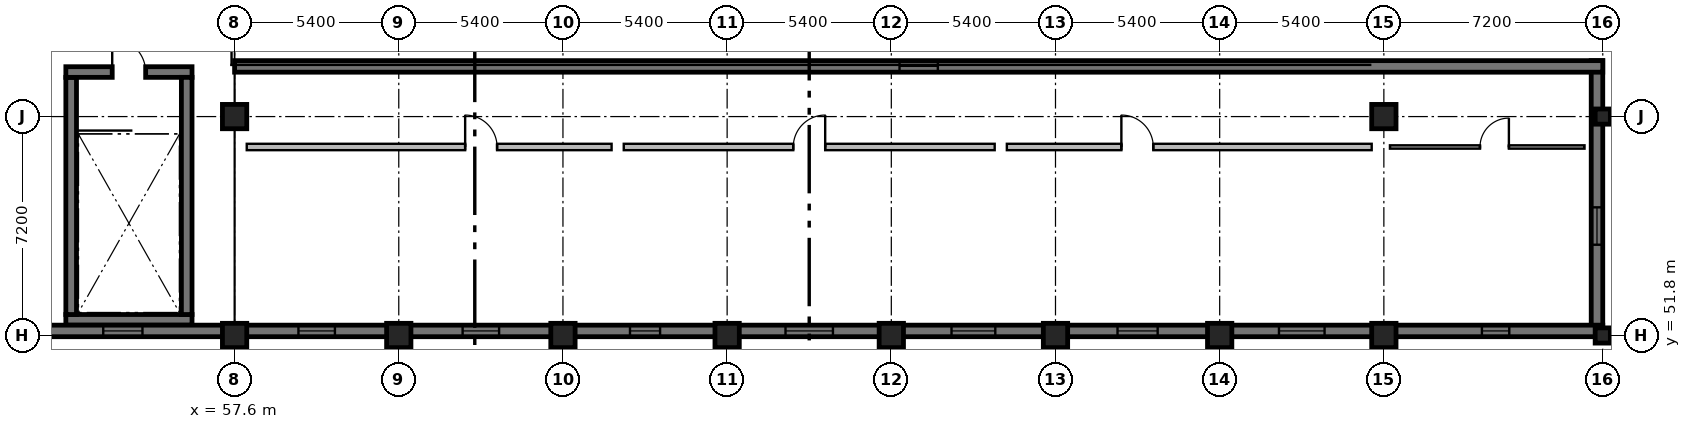
"""IFC4 building model, lengths in metres.
Left out: names, types, materials, properties, quantities, classifications, styles, units other than length and angle.
Written with IfcOpenShell. Run it as: python <this file> out.ifc"""

import sys

from ifc_helpers import new_model, si_unit, direction, frame, frame_2d, origin, origin_2d, place, context, subcontext, project, spatial, rectangle, extrude, element, fill, save


model = new_model("IFC4")
c1 = context("Model", 3, precision=1e-05, world=origin(), true_north=direction((0.0, 1.0)))
c2 = subcontext(c1, "Body", "Model", "MODEL_VIEW")
j1 = project(units=[si_unit("LENGTHUNIT", "METRE"), si_unit("PLANEANGLEUNIT", "RADIAN")], contexts=[c1])
p1 = place(None, origin())
s1 = spatial("IfcSite", under=j1, at=p1, CompositionType="ELEMENT")
p2 = place(p1, origin())
s2 = spatial("IfcBuilding", under=s1, at=p2, CompositionType="ELEMENT")
p3 = place(p2, frame((0.0, 0.0, 13.2)))
s3 = spatial("IfcBuildingStorey", under=s2, at=p3, CompositionType="ELEMENT", Elevation=13.2)
p4 = place(p3, frame((68.4, 51.8, 0.0), z_axis=(0.0, 0.0, 1.0), x_axis=(1.0, 0.0, 0.0)))
e1 = element("IfcColumn", 1, at=p4, inside=s3, PredefinedType="COLUMN", context=c2, shape_type="SweptSolid", body=[
    extrude(rectangle(XDim=0.8, YDim=0.8, at=origin_2d()), origin(), (0.0, 0.0, 1.0), 7.44),
])
for number, where, z_axis, x_axis in (
    (2, (73.8, 51.8, 0.0), (0.0, 0.0, 1.0), (1.0, 0.0, 0.0)),
    (3, (79.2, 51.8, 0.0), (0.0, 0.0, 1.0), (1.0, 0.0, 0.0)),
):
    element("IfcColumn", number, at=place(p3, frame(where, z_axis=z_axis, x_axis=x_axis)), inside=s3, PredefinedType="COLUMN", context=c2, shape_type="SweptSolid", body=[
        extrude(rectangle(XDim=0.8, YDim=0.8, at=origin_2d()), origin(), (0.0, 0.0, 1.0), 8.699),
    ])
p5 = place(p3, frame((84.6, 51.8, 0.0), z_axis=(0.0, 0.0, 1.0), x_axis=(1.0, 0.0, 0.0)))
e4 = element("IfcColumn", 4, at=p5, inside=s3, PredefinedType="COLUMN", context=c2, shape_type="SweptSolid", body=[
    extrude(rectangle(XDim=0.8, YDim=0.8, at=origin_2d()), origin(), (0.0, 0.0, 1.0), 7.44),
])
p6 = place(p3, frame((90.0, 51.8, 0.0), z_axis=(0.0, 0.0, 1.0), x_axis=(1.0, 0.0, 0.0)))
e5 = element("IfcColumn", 5, at=p6, inside=s3, PredefinedType="COLUMN", context=c2, shape_type="SweptSolid", body=[
    extrude(rectangle(XDim=0.8, YDim=0.8, at=origin_2d()), origin(), (0.0, 0.0, 1.0), 5.705),
])
p7 = place(p3, frame((95.4, 51.8, 0.0), z_axis=(0.0, 0.0, 1.0), x_axis=(1.0, 0.0, 0.0)))
e6 = element("IfcColumn", 6, at=p7, inside=s3, PredefinedType="COLUMN", context=c2, shape_type="SweptSolid", body=[
    extrude(rectangle(XDim=0.8, YDim=0.8, at=origin_2d()), origin(), (0.0, 0.0, 1.0), 3.9),
])
p8 = place(p3, frame((95.4, 59.0, 0.0), z_axis=(0.0, 0.0, 1.0), x_axis=(1.0, 0.0, 0.0)))
e7 = element("IfcColumn", 7, at=p8, inside=s3, PredefinedType="COLUMN", context=c2, shape_type="SweptSolid", body=[
    extrude(rectangle(XDim=0.8, YDim=0.8, at=origin_2d()), origin(), (0.0, 0.0, 1.0), 5.542),
])
for number, where, z_axis, x_axis in (
    (8, (102.6, 51.8, 0.0), (0.0, 0.0, 1.0), (1.0, 0.0, 0.0)),
    (9, (102.6, 59.0, 0.0), (0.0, 0.0, 1.0), (1.0, 0.0, 0.0)),
):
    element("IfcColumn", number, at=place(p3, frame(where, z_axis=z_axis, x_axis=x_axis)), inside=s3, PredefinedType="COLUMN", context=c2, shape_type="SweptSolid", body=[
        extrude(rectangle(XDim=0.5, YDim=0.5, at=origin_2d()), origin(), (0.0, 0.0, 1.0), 3.9),
    ])
p9 = place(p3, frame((57.6, 51.8, 0.0), z_axis=(0.0, 0.0, 1.0), x_axis=(1.0, 0.0, 0.0)))
e10 = element("IfcColumn", 10, at=p9, inside=s3, PredefinedType="COLUMN", context=c2, shape_type="SweptSolid", body=[
    extrude(rectangle(XDim=0.8, YDim=0.8, at=origin_2d()), origin(), (0.0, 0.0, 1.0), 3.9),
])
p10 = place(p3, frame((57.6, 59.0, 0.0), z_axis=(0.0, 0.0, 1.0), x_axis=(1.0, 0.0, 0.0)))
e11 = element("IfcColumn", 11, at=p10, inside=s3, PredefinedType="COLUMN", context=c2, shape_type="SweptSolid", body=[
    extrude(rectangle(XDim=0.8, YDim=0.8, at=origin_2d()), origin(), (0.0, 0.0, 1.0), 5.542),
])
p11 = place(p3, frame((63.0, 51.8, 0.0), z_axis=(0.0, 0.0, 1.0), x_axis=(1.0, 0.0, 0.0)))
e12 = element("IfcColumn", 12, at=p11, inside=s3, PredefinedType="COLUMN", context=c2, shape_type="SweptSolid", body=[
    extrude(rectangle(XDim=0.8, YDim=0.8, at=origin_2d()), origin(), (0.0, 0.0, 1.0), 5.705),
])
p12 = place(p3, frame((56.2, 52.315, 0.0), z_axis=(0.0, 0.0, 1.0), x_axis=(-1.0, 0.0, 0.0)))
e13 = element("IfcWall", 13, at=p12, inside=s3, PredefinedType="SOLIDWALL", context=c2, shape_type="SweptSolid", body=[
    extrude(rectangle(XDim=4.15, YDim=0.35, at=frame_2d((2.075, 0.0))), origin(), (0.0, 0.0, 1.0), 4.3),
])
p13 = place(p3, frame((52.225, 52.49, 0.0), z_axis=(0.0, 0.0, 1.0), x_axis=(0.0, 1.0, 0.0)))
e14 = element("IfcWall", 14, at=p13, inside=s3, PredefinedType="SOLIDWALL", context=c2, shape_type="SweptSolid", body=[
    extrude(rectangle(XDim=7.8, YDim=0.35, at=frame_2d((3.9, 0.0))), origin(), (0.0, 0.0, 1.0), 4.3),
])
p14 = place(p3, frame((52.05, 60.465, 0.0), z_axis=(0.0, 0.0, 1.0), x_axis=(1.0, 0.0, 0.0)))
e15 = element("IfcWall", 15, at=p14, inside=s3, PredefinedType="SOLIDWALL", context=c2, shape_type="SweptSolid", body=[
    extrude(rectangle(XDim=4.15, YDim=0.35, at=frame_2d((2.075, 0.0))), origin(), (0.0, 0.0, 1.0), 4.3),
])
p15 = place(p14, frame((1.525, 0.0, 0.0)))
e16 = element("IfcOpeningElement", 16, at=p15, cuts=e15, PredefinedType="OPENING", context=c2, shape_type="SweptSolid", body=[
    extrude(rectangle(XDim=1.1, YDim=2.15, at=frame_2d((0.55, 1.075))), frame((0.0, 0.195, 0.0), z_axis=(0.0, -1.0, 0.0), x_axis=(1.0, 0.0, 0.0)), (0.0, 0.0, 1.0), 0.39),
])
p16 = place(p3, frame((56.025, 60.29, 0.0), z_axis=(0.0, 0.0, 1.0), x_axis=(0.0, -1.0, 0.0)))
e17 = element("IfcWall", 17, at=p16, inside=s3, PredefinedType="SOLIDWALL", context=c2, shape_type="SweptSolid", body=[
    extrude(rectangle(XDim=7.8, YDim=0.35, at=frame_2d((3.9, 0.0))), origin(), (0.0, 0.0, 1.0), 4.3),
])
p17 = place(p3, frame((102.41, 51.8, 0.0), z_axis=(0.0, 0.0, 1.0), x_axis=(0.0, 1.0, 0.0)))
e18 = element("IfcWall", 18, at=p17, inside=s3, PredefinedType="SOLIDWALL", context=c2, shape_type="SweptSolid", body=[
    extrude(rectangle(XDim=9.04, YDim=0.38, at=frame_2d((4.52, 0.0))), origin(), (0.0, 0.0, 1.0), 3.65),
])
p18 = place(p17, frame((2.985, 0.0, 0.95)))
e19 = element("IfcOpeningElement", 19, at=p18, cuts=e18, PredefinedType="OPENING", context=c2, shape_type="SweptSolid", body=[
    extrude(rectangle(XDim=1.23, YDim=1.65, at=frame_2d((0.615, 0.825))), frame((0.0, 0.21, 0.0), z_axis=(0.0, -1.0, 0.0), x_axis=(1.0, 0.0, 0.0)), (0.0, 0.0, 1.0), 0.42),
])
p19 = place(p3, frame((57.6, 60.65, 0.0), z_axis=(0.0, 0.0, 1.0), x_axis=(1.0, 0.0, 0.0)))
e20 = element("IfcWall", 20, at=p19, inside=s3, PredefinedType="SOLIDWALL", context=c2, shape_type="SweptSolid", body=[
    extrude(rectangle(XDim=45.0, YDim=0.38, at=frame_2d((22.5, 0.0))), origin(), (0.0, 0.0, 1.0), 3.65),
])
p20 = place(p19, frame((21.87, 0.0, 0.95)))
e21 = element("IfcOpeningElement", 21, at=p20, cuts=e20, PredefinedType="OPENING", context=c2, shape_type="SweptSolid", body=[
    extrude(rectangle(XDim=1.26, YDim=1.65, at=frame_2d((0.63, 0.825))), frame((0.0, 0.21, 0.0), z_axis=(0.0, -1.0, 0.0), x_axis=(1.0, 0.0, 0.0)), (0.0, 0.0, 1.0), 0.42),
])
p21 = place(p3, frame((50.4, 51.95, 0.0), z_axis=(0.0, 0.0, 1.0), x_axis=(1.0, 0.0, 0.0)))
e22 = element("IfcWall", 22, at=p21, inside=s3, PredefinedType="SOLIDWALL", context=c2, shape_type="SweptSolid", body=[
    extrude(rectangle(XDim=52.2, YDim=0.38, at=frame_2d((26.1, 0.0))), origin(), (0.0, 0.0, 1.0), 3.2),
])
p22 = place(p21, frame((2.88, 0.0, 0.95)))
e23 = element("IfcOpeningElement", 23, at=p22, cuts=e22, PredefinedType="OPENING", context=c2, shape_type="SweptSolid", body=[
    extrude(rectangle(XDim=1.29, YDim=1.65, at=frame_2d((0.645, 0.825))), frame((0.0, 0.21, 0.0), z_axis=(0.0, -1.0, 0.0), x_axis=(1.0, 0.0, 0.0)), (0.0, 0.0, 1.0), 0.42),
])
p23 = place(p21, frame((9.3, 0.0, 0.95)))
e24 = element("IfcOpeningElement", 24, at=p23, cuts=e22, PredefinedType="OPENING", context=c2, shape_type="SweptSolid", body=[
    extrude(rectangle(XDim=1.2, YDim=1.9, at=frame_2d((0.6, 0.95))), frame((0.0, 0.21, 0.0), z_axis=(0.0, -1.0, 0.0), x_axis=(1.0, 0.0, 0.0)), (0.0, 0.0, 1.0), 0.42),
])
p24 = place(p21, frame((14.7, 0.0, 0.95)))
e25 = element("IfcOpeningElement", 25, at=p24, cuts=e22, PredefinedType="OPENING", context=c2, shape_type="SweptSolid", body=[
    extrude(rectangle(XDim=1.2, YDim=2.05, at=frame_2d((0.6, 1.025))), frame((0.0, 0.21, 0.0), z_axis=(0.0, -1.0, 0.0), x_axis=(1.0, 0.0, 0.0)), (0.0, 0.0, 1.0), 0.42),
])
p25 = place(p21, frame((20.205, 0.0, 0.95)))
e26 = element("IfcOpeningElement", 26, at=p25, cuts=e22, PredefinedType="OPENING", context=c2, shape_type="SweptSolid", body=[
    extrude(rectangle(XDim=0.99, YDim=1.55, at=frame_2d((0.495, 0.775))), frame((0.0, 0.21, 0.0), z_axis=(0.0, -1.0, 0.0), x_axis=(1.0, 0.0, 0.0)), (0.0, 0.0, 1.0), 0.42),
])
p26 = place(p21, frame((25.32, 0.0, 0.95)))
e27 = element("IfcOpeningElement", 27, at=p26, cuts=e22, PredefinedType="OPENING", context=c2, shape_type="SweptSolid", body=[
    extrude(rectangle(XDim=1.56, YDim=1.75, at=frame_2d((0.78, 0.875))), frame((0.0, 0.21, 0.0), z_axis=(0.0, -1.0, 0.0), x_axis=(1.0, 0.0, 0.0)), (0.0, 0.0, 1.0), 0.42),
])
p27 = place(p21, frame((30.78, 0.0, 0.95)))
e28 = element("IfcOpeningElement", 28, at=p27, cuts=e22, PredefinedType="OPENING", context=c2, shape_type="SweptSolid", body=[
    extrude(rectangle(XDim=1.44, YDim=1.7, at=frame_2d((0.72, 0.85))), frame((0.0, 0.21, 0.0), z_axis=(0.0, -1.0, 0.0), x_axis=(1.0, 0.0, 0.0)), (0.0, 0.0, 1.0), 0.42),
])
p28 = place(p21, frame((36.24, 0.0, 0.95)))
e29 = element("IfcOpeningElement", 29, at=p28, cuts=e22, PredefinedType="OPENING", context=c2, shape_type="SweptSolid", body=[
    extrude(rectangle(XDim=1.32, YDim=1.9, at=frame_2d((0.66, 0.95))), frame((0.0, 0.21, 0.0), z_axis=(0.0, -1.0, 0.0), x_axis=(1.0, 0.0, 0.0)), (0.0, 0.0, 1.0), 0.42),
])
p29 = place(p21, frame((41.55, 0.0, 0.95)))
e30 = element("IfcOpeningElement", 30, at=p29, cuts=e22, PredefinedType="OPENING", context=c2, shape_type="SweptSolid", body=[
    extrude(rectangle(XDim=1.5, YDim=2.0, at=frame_2d((0.75, 1.0))), frame((0.0, 0.21, 0.0), z_axis=(0.0, -1.0, 0.0), x_axis=(1.0, 0.0, 0.0)), (0.0, 0.0, 1.0), 0.42),
])
p30 = place(p21, frame((48.225, 0.0, 0.95)))
e31 = element("IfcOpeningElement", 31, at=p30, cuts=e22, PredefinedType="OPENING", context=c2, shape_type="SweptSolid", body=[
    extrude(rectangle(XDim=0.9, YDim=1.55, at=frame_2d((0.45, 0.775))), frame((0.0, 0.21, 0.0), z_axis=(0.0, -1.0, 0.0), x_axis=(1.0, 0.0, 0.0)), (0.0, 0.0, 1.0), 0.42),
])
p31 = place(p3, frame((58.0, 58.0, 0.0), z_axis=(0.0, 0.0, 1.0), x_axis=(1.0, 0.0, 0.0)))
e32 = element("IfcWall", 32, at=p31, inside=s3, PredefinedType="PARTITIONING", context=c2, shape_type="SweptSolid", body=[
    extrude(rectangle(XDim=12.0, YDim=0.21, at=frame_2d((6.0, 0.0))), origin(), (0.0, 0.0, 1.0), 3.66),
])
p32 = place(p31, frame((7.183, 0.0, 0.0)))
e33 = element("IfcOpeningElement", 33, at=p32, cuts=e32, PredefinedType="OPENING", context=c2, shape_type="SweptSolid", body=[
    extrude(rectangle(XDim=1.05, YDim=2.15, at=frame_2d((0.525, 1.075))), frame((0.0, 0.125, 0.0), z_axis=(0.0, -1.0, 0.0), x_axis=(1.0, 0.0, 0.0)), (0.0, 0.0, 1.0), 0.25),
])
p33 = place(p3, frame((70.4, 58.0, 0.0), z_axis=(0.0, 0.0, 1.0), x_axis=(1.0, 0.0, 0.0)))
e34 = element("IfcWall", 34, at=p33, inside=s3, PredefinedType="PARTITIONING", context=c2, shape_type="SweptSolid", body=[
    extrude(rectangle(XDim=12.2, YDim=0.21, at=frame_2d((6.1, 0.0))), origin(), (0.0, 0.0, 1.0), 3.66),
])
p34 = place(p33, frame((5.575, 0.0, 0.0)))
e35 = element("IfcOpeningElement", 35, at=p34, cuts=e34, PredefinedType="OPENING", context=c2, shape_type="SweptSolid", body=[
    extrude(rectangle(XDim=1.05, YDim=2.15, at=frame_2d((0.525, 1.075))), frame((0.0, 0.125, 0.0), z_axis=(0.0, -1.0, 0.0), x_axis=(1.0, 0.0, 0.0)), (0.0, 0.0, 1.0), 0.25),
])
p35 = place(p3, frame((83.0, 58.0, 0.0), z_axis=(0.0, 0.0, 1.0), x_axis=(1.0, 0.0, 0.0)))
e36 = element("IfcWall", 36, at=p35, inside=s3, PredefinedType="PARTITIONING", context=c2, shape_type="SweptSolid", body=[
    extrude(rectangle(XDim=12.0, YDim=0.21, at=frame_2d((6.0, 0.0))), origin(), (0.0, 0.0, 1.0), 3.66),
])
p36 = place(p35, frame((3.767, 0.0, 0.0)))
e37 = element("IfcOpeningElement", 37, at=p36, cuts=e36, PredefinedType="OPENING", context=c2, shape_type="SweptSolid", body=[
    extrude(rectangle(XDim=1.05, YDim=2.15, at=frame_2d((0.525, 1.075))), frame((0.0, 0.125, 0.0), z_axis=(0.0, -1.0, 0.0), x_axis=(1.0, 0.0, 0.0)), (0.0, 0.0, 1.0), 0.25),
])
p37 = place(p3, frame((95.6, 58.0, 0.0), z_axis=(0.0, 0.0, 1.0), x_axis=(1.0, 0.0, 0.0)))
e38 = element("IfcWall", 38, at=p37, inside=s3, PredefinedType="PARTITIONING", context=c2, shape_type="SweptSolid", body=[
    extrude(rectangle(XDim=6.4, YDim=0.11, at=frame_2d((3.2, 0.0))), origin(), (0.0, 0.0, 1.0), 3.66),
])
p38 = place(p37, frame((2.962, 0.0, 0.0)))
e39 = element("IfcOpeningElement", 39, at=p38, cuts=e38, PredefinedType="OPENING", context=c2, shape_type="SweptSolid", body=[
    extrude(rectangle(XDim=0.95, YDim=2.1, at=frame_2d((0.475, 1.05))), frame((0.0, 0.075, 0.0), z_axis=(0.0, -1.0, 0.0), x_axis=(1.0, 0.0, 0.0)), (0.0, 0.0, 1.0), 0.15),
])
p39 = place(p15, origin())
e40 = element("IfcDoor", 40, at=p39, inside=s3, OperationType="SINGLE_SWING_LEFT", PredefinedType="DOOR", context=c2, shape_type="SweptSolid", body=[
    extrude(rectangle(XDim=1.1, YDim=2.15, at=frame_2d((0.55, 1.075))), frame((0.0, 0.025, 0.0), z_axis=(0.0, -1.0, 0.0), x_axis=(1.0, 0.0, 0.0)), (0.0, 0.0, 1.0), 0.05),
])
fill(e16, e40)
p40 = place(p18, origin())
e41 = element("IfcWindow", 41, at=p40, inside=s3, PartitioningType="SINGLE_PANEL", PredefinedType="WINDOW", context=c2, shape_type="SweptSolid", body=[
    extrude(rectangle(XDim=1.23, YDim=1.65, at=frame_2d((0.615, 0.825))), frame((0.0, 0.03, 0.0), z_axis=(0.0, -1.0, 0.0), x_axis=(1.0, 0.0, 0.0)), (0.0, 0.0, 1.0), 0.06),
])
fill(e19, e41)
p41 = place(p20, origin())
e42 = element("IfcWindow", 42, at=p41, inside=s3, PartitioningType="SINGLE_PANEL", PredefinedType="WINDOW", context=c2, shape_type="SweptSolid", body=[
    extrude(rectangle(XDim=1.26, YDim=1.65, at=frame_2d((0.63, 0.825))), frame((0.0, 0.03, 0.0), z_axis=(0.0, -1.0, 0.0), x_axis=(1.0, 0.0, 0.0)), (0.0, 0.0, 1.0), 0.06),
])
fill(e21, e42)
p42 = place(p22, origin())
e43 = element("IfcWindow", 43, at=p42, inside=s3, PartitioningType="SINGLE_PANEL", PredefinedType="WINDOW", context=c2, shape_type="SweptSolid", body=[
    extrude(rectangle(XDim=1.29, YDim=1.65, at=frame_2d((0.645, 0.825))), frame((0.0, 0.03, 0.0), z_axis=(0.0, -1.0, 0.0), x_axis=(1.0, 0.0, 0.0)), (0.0, 0.0, 1.0), 0.06),
])
fill(e23, e43)
p43 = place(p23, origin())
e44 = element("IfcWindow", 44, at=p43, inside=s3, PartitioningType="SINGLE_PANEL", PredefinedType="WINDOW", context=c2, shape_type="SweptSolid", body=[
    extrude(rectangle(XDim=1.2, YDim=1.9, at=frame_2d((0.6, 0.95))), frame((0.0, 0.03, 0.0), z_axis=(0.0, -1.0, 0.0), x_axis=(1.0, 0.0, 0.0)), (0.0, 0.0, 1.0), 0.06),
])
fill(e24, e44)
p44 = place(p24, origin())
e45 = element("IfcWindow", 45, at=p44, inside=s3, PartitioningType="SINGLE_PANEL", PredefinedType="WINDOW", context=c2, shape_type="SweptSolid", body=[
    extrude(rectangle(XDim=1.2, YDim=2.05, at=frame_2d((0.6, 1.025))), frame((0.0, 0.03, 0.0), z_axis=(0.0, -1.0, 0.0), x_axis=(1.0, 0.0, 0.0)), (0.0, 0.0, 1.0), 0.06),
])
fill(e25, e45)
p45 = place(p25, origin())
e46 = element("IfcWindow", 46, at=p45, inside=s3, PartitioningType="SINGLE_PANEL", PredefinedType="WINDOW", context=c2, shape_type="SweptSolid", body=[
    extrude(rectangle(XDim=0.99, YDim=1.55, at=frame_2d((0.495, 0.775))), frame((0.0, 0.03, 0.0), z_axis=(0.0, -1.0, 0.0), x_axis=(1.0, 0.0, 0.0)), (0.0, 0.0, 1.0), 0.06),
])
fill(e26, e46)
p46 = place(p26, origin())
e47 = element("IfcWindow", 47, at=p46, inside=s3, PartitioningType="SINGLE_PANEL", PredefinedType="WINDOW", context=c2, shape_type="SweptSolid", body=[
    extrude(rectangle(XDim=1.56, YDim=1.75, at=frame_2d((0.78, 0.875))), frame((0.0, 0.03, 0.0), z_axis=(0.0, -1.0, 0.0), x_axis=(1.0, 0.0, 0.0)), (0.0, 0.0, 1.0), 0.06),
])
fill(e27, e47)
p47 = place(p27, origin())
e48 = element("IfcWindow", 48, at=p47, inside=s3, PartitioningType="SINGLE_PANEL", PredefinedType="WINDOW", context=c2, shape_type="SweptSolid", body=[
    extrude(rectangle(XDim=1.44, YDim=1.7, at=frame_2d((0.72, 0.85))), frame((0.0, 0.03, 0.0), z_axis=(0.0, -1.0, 0.0), x_axis=(1.0, 0.0, 0.0)), (0.0, 0.0, 1.0), 0.06),
])
fill(e28, e48)
p48 = place(p28, origin())
e49 = element("IfcWindow", 49, at=p48, inside=s3, PartitioningType="SINGLE_PANEL", PredefinedType="WINDOW", context=c2, shape_type="SweptSolid", body=[
    extrude(rectangle(XDim=1.32, YDim=1.9, at=frame_2d((0.66, 0.95))), frame((0.0, 0.03, 0.0), z_axis=(0.0, -1.0, 0.0), x_axis=(1.0, 0.0, 0.0)), (0.0, 0.0, 1.0), 0.06),
])
fill(e29, e49)
p49 = place(p29, origin())
e50 = element("IfcWindow", 50, at=p49, inside=s3, PartitioningType="SINGLE_PANEL", PredefinedType="WINDOW", context=c2, shape_type="SweptSolid", body=[
    extrude(rectangle(XDim=1.5, YDim=2.0, at=frame_2d((0.75, 1.0))), frame((0.0, 0.03, 0.0), z_axis=(0.0, -1.0, 0.0), x_axis=(1.0, 0.0, 0.0)), (0.0, 0.0, 1.0), 0.06),
])
fill(e30, e50)
p50 = place(p30, origin())
e51 = element("IfcWindow", 51, at=p50, inside=s3, PartitioningType="SINGLE_PANEL", PredefinedType="WINDOW", context=c2, shape_type="SweptSolid", body=[
    extrude(rectangle(XDim=0.9, YDim=1.55, at=frame_2d((0.45, 0.775))), frame((0.0, 0.03, 0.0), z_axis=(0.0, -1.0, 0.0), x_axis=(1.0, 0.0, 0.0)), (0.0, 0.0, 1.0), 0.06),
])
fill(e31, e51)
p51 = place(p32, origin())
e52 = element("IfcDoor", 52, at=p51, inside=s3, OperationType="SINGLE_SWING_LEFT", PredefinedType="DOOR", context=c2, shape_type="SweptSolid", body=[
    extrude(rectangle(XDim=1.05, YDim=2.15, at=frame_2d((0.525, 1.075))), frame((0.0, 0.025, 0.0), z_axis=(0.0, -1.0, 0.0), x_axis=(1.0, 0.0, 0.0)), (0.0, 0.0, 1.0), 0.05),
])
fill(e33, e52)
p52 = place(p34, origin())
e53 = element("IfcDoor", 53, at=p52, inside=s3, OperationType="SINGLE_SWING_RIGHT", PredefinedType="DOOR", context=c2, shape_type="SweptSolid", body=[
    extrude(rectangle(XDim=1.05, YDim=2.15, at=frame_2d((0.525, 1.075))), frame((0.0, 0.025, 0.0), z_axis=(0.0, -1.0, 0.0), x_axis=(1.0, 0.0, 0.0)), (0.0, 0.0, 1.0), 0.05),
])
fill(e35, e53)
p53 = place(p36, origin())
e54 = element("IfcDoor", 54, at=p53, inside=s3, OperationType="SINGLE_SWING_LEFT", PredefinedType="DOOR", context=c2, shape_type="SweptSolid", body=[
    extrude(rectangle(XDim=1.05, YDim=2.15, at=frame_2d((0.525, 1.075))), frame((0.0, 0.025, 0.0), z_axis=(0.0, -1.0, 0.0), x_axis=(1.0, 0.0, 0.0)), (0.0, 0.0, 1.0), 0.05),
])
fill(e37, e54)
p54 = place(p38, origin())
e55 = element("IfcDoor", 55, at=p54, inside=s3, OperationType="SINGLE_SWING_RIGHT", PredefinedType="DOOR", context=c2, shape_type="SweptSolid", body=[
    extrude(rectangle(XDim=0.95, YDim=2.1, at=frame_2d((0.475, 1.05))), frame((0.0, 0.025, 0.0), z_axis=(0.0, -1.0, 0.0), x_axis=(1.0, 0.0, 0.0)), (0.0, 0.0, 1.0), 0.05),
])
fill(e39, e55)
save(model, sys.argv[1])
